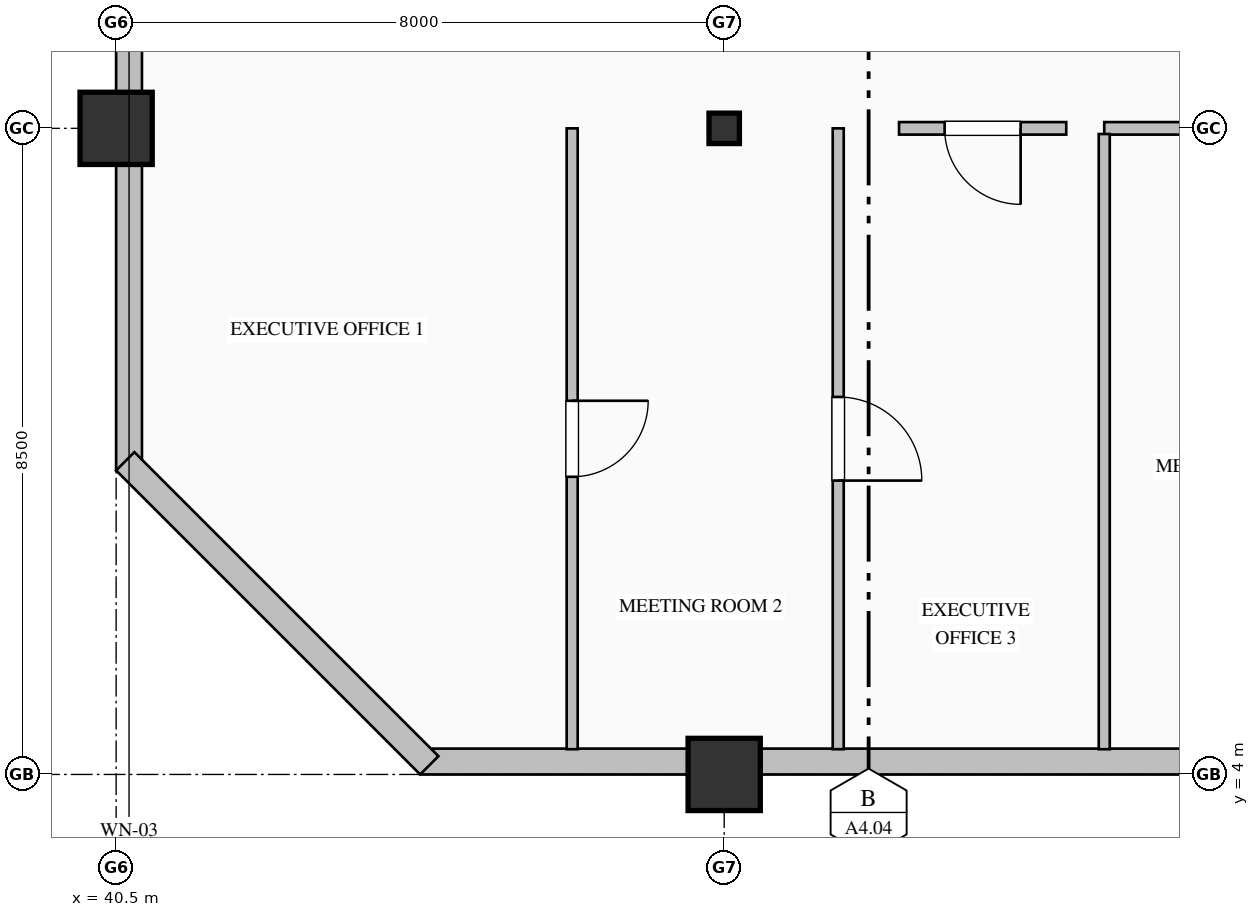
"""IFC4 building model, lengths in metres.
Left out: names, types, materials, properties, quantities, classifications, styles, units other than length and angle.
Written with IfcOpenShell. Run it as: python <this file> out.ifc"""

import sys

from ifc_helpers import new_model, si_unit, direction, frame, frame_2d, origin, origin_2d, place, context, subcontext, project, spatial, rectangle, hollow_rectangle, i_section, extrude, element, fill, save


model = new_model("IFC4")
c1 = context("Model", 3, precision=1e-05, world=origin(), true_north=direction((0.0, 1.0)))
c2 = subcontext(c1, "Body", "Model", "MODEL_VIEW")
j1 = project(units=[si_unit("LENGTHUNIT", "METRE"), si_unit("PLANEANGLEUNIT", "RADIAN")], contexts=[c1])
p1 = place(None, origin())
s1 = spatial("IfcSite", under=j1, at=p1, CompositionType="ELEMENT")
p2 = place(p1, origin())
s2 = spatial("IfcBuilding", under=s1, at=p2, CompositionType="ELEMENT")
p3 = place(p2, frame((0.0, 0.0, 127.0)))
s3 = spatial("IfcBuildingStorey", under=s2, at=p3, CompositionType="ELEMENT", Elevation=127.0)
for number, where, z_axis, x_axis in (
    (1, (40.5, 12.5, 0.0), (0.0, 0.0, 1.0), (1.0, 0.0, 0.0)),
    (2, (48.5, 4.0, 0.0), (0.0, 0.0, 1.0), (1.0, 0.0, 0.0)),
):
    element("IfcColumn", number, at=place(p3, frame(where, z_axis=z_axis, x_axis=x_axis)), inside=s3, PredefinedType="COLUMN", context=c2, shape_type="SweptSolid", body=[
        extrude(hollow_rectangle(XDim=0.95, YDim=0.95, WallThickness=0.036, at=origin_2d()), origin(), (0.0, 0.0, 1.0), 4.0),
    ])
p4 = place(p3, frame((48.5, 12.5, 0.0), z_axis=(0.0, 0.0, 1.0), x_axis=(1.0, 0.0, 0.0)))
e3 = element("IfcColumn", 3, at=p4, inside=s3, PredefinedType="COLUMN", context=c2, shape_type="SweptSolid", body=[
    extrude(i_section(OverallWidth=0.4, OverallDepth=0.4, WebThickness=0.013, FlangeThickness=0.021, FilletRadius=0.022, at=origin_2d()), origin(), (0.0, 0.0, 1.0), 4.0),
])
p5 = place(p3, frame((40.67, 8.0, 0.0), z_axis=(0.0, 0.0, 1.0), x_axis=(0.0, 1.0, 0.0)))
e4 = element("IfcWall", 4, at=p5, inside=s3, PredefinedType="SOLIDWALL", context=c2, shape_type="SweptSolid", body=[
    extrude(rectangle(XDim=20.34, YDim=0.34, at=frame_2d((10.17, 0.0))), origin(), (0.0, 0.0, 1.0), 3.165),
])
p6 = place(p5, frame((13.65, 0.0, 0.85)))
e5 = element("IfcOpeningElement", 5, at=p6, cuts=e4, PredefinedType="OPENING", context=c2, shape_type="SweptSolid", body=[
    extrude(rectangle(XDim=1.5, YDim=1.95, at=frame_2d((0.75, 0.975))), frame((0.0, 0.18, 0.0), z_axis=(0.0, -1.0, 0.0), x_axis=(1.0, 0.0, 0.0)), (0.0, 0.0, 1.0), 0.36),
])
p7 = place(p3, frame((60.0, 4.17, 0.0), z_axis=(0.0, 0.0, 1.0), x_axis=(-1.0, 0.0, 0.0)))
e6 = element("IfcWall", 6, at=p7, inside=s3, PredefinedType="SOLIDWALL", context=c2, shape_type="SweptSolid", body=[
    extrude(rectangle(XDim=15.5, YDim=0.34, at=frame_2d((7.75, 0.0))), origin(), (0.0, 0.0, 1.0), 3.265),
])
p8 = place(p3, frame((44.62, 4.12, 0.0), z_axis=(0.0, 0.0, 1.0), x_axis=(-0.707106781187, 0.707106781187, 0.0)))
e7 = element("IfcWall", 7, at=p8, inside=s3, PredefinedType="SOLIDWALL", context=c2, shape_type="SweptSolid", body=[
    extrude(rectangle(XDim=5.657, YDim=0.34, at=frame_2d((2.828, 0.0))), origin(), (0.0, 0.0, 1.0), 3.765),
])
p9 = place(p3, frame((53.0, 12.5, 0.0), z_axis=(0.0, 0.0, 1.0), x_axis=(-1.0, 0.0, 0.0)))
e8 = element("IfcWall", 8, at=p9, inside=s3, PredefinedType="PARTITIONING", context=c2, shape_type="SweptSolid", body=[
    extrude(rectangle(XDim=2.2, YDim=0.165, at=frame_2d((1.1, 0.0))), origin(), (0.0, 0.0, 1.0), 3.157),
])
p10 = place(p9, frame((0.6, 0.0, 0.0)))
e9 = element("IfcOpeningElement", 9, at=p10, cuts=e8, PredefinedType="OPENING", context=c2, shape_type="SweptSolid", body=[
    extrude(rectangle(XDim=1.0, YDim=2.15, at=frame_2d((0.5, 1.075))), frame((0.0, 0.093, 0.0), z_axis=(0.0, -1.0, 0.0), x_axis=(1.0, 0.0, 0.0)), (0.0, 0.0, 1.0), 0.185),
])
p11 = place(p3, frame((57.0, 12.5, 0.0), z_axis=(0.0, 0.0, 1.0), x_axis=(-1.0, 0.0, 0.0)))
e10 = element("IfcWall", 10, at=p11, inside=s3, PredefinedType="PARTITIONING", context=c2, shape_type="SweptSolid", body=[
    extrude(rectangle(XDim=3.5, YDim=0.165, at=frame_2d((1.75, 0.0))), origin(), (0.0, 0.0, 1.0), 3.157),
])
p12 = place(p11, frame((1.2, 0.0, 0.0)))
e11 = element("IfcOpeningElement", 11, at=p12, cuts=e10, PredefinedType="OPENING", context=c2, shape_type="SweptSolid", body=[
    extrude(rectangle(XDim=1.1, YDim=2.2, at=frame_2d((0.55, 1.1))), frame((0.0, 0.093, 0.0), z_axis=(0.0, -1.0, 0.0), x_axis=(1.0, 0.0, 0.0)), (0.0, 0.0, 1.0), 0.185),
])
p13 = place(p3, frame((46.5, 12.5, 0.0), z_axis=(0.0, 0.0, 1.0), x_axis=(0.0, -1.0, 0.0)))
e12 = element("IfcWall", 12, at=p13, inside=s3, PredefinedType="PARTITIONING", context=c2, shape_type="SweptSolid", body=[
    extrude(rectangle(XDim=8.168, YDim=0.145, at=frame_2d((4.084, 0.0))), origin(), (0.0, 0.0, 1.0), 3.765),
])
p14 = place(p13, frame((3.584, 0.0, 0.0)))
e13 = element("IfcOpeningElement", 13, at=p14, cuts=e12, PredefinedType="OPENING", context=c2, shape_type="SweptSolid", body=[
    extrude(rectangle(XDim=1.0, YDim=2.15, at=frame_2d((0.5, 1.075))), frame((0.0, 0.083, 0.0), z_axis=(0.0, -1.0, 0.0), x_axis=(1.0, 0.0, 0.0)), (0.0, 0.0, 1.0), 0.165),
])
p15 = place(p3, frame((50.0, 12.5, 0.0), z_axis=(0.0, 0.0, 1.0), x_axis=(0.0, -1.0, 0.0)))
e14 = element("IfcWall", 14, at=p15, inside=s3, PredefinedType="PARTITIONING", context=c2, shape_type="SweptSolid", body=[
    extrude(rectangle(XDim=8.168, YDim=0.145, at=frame_2d((4.084, 0.0))), origin(), (0.0, 0.0, 1.0), 3.765),
])
p16 = place(p15, frame((3.534, 0.0, 0.0)))
e15 = element("IfcOpeningElement", 15, at=p16, cuts=e14, PredefinedType="OPENING", context=c2, shape_type="SweptSolid", body=[
    extrude(rectangle(XDim=1.1, YDim=2.2, at=frame_2d((0.55, 1.1))), frame((0.0, 0.083, 0.0), z_axis=(0.0, -1.0, 0.0), x_axis=(1.0, 0.0, 0.0)), (0.0, 0.0, 1.0), 0.165),
])
p17 = place(p3, frame((53.5, 12.426, 0.0), z_axis=(0.0, 0.0, 1.0), x_axis=(0.0, -1.0, 0.0)))
e16 = element("IfcWall", 16, at=p17, inside=s3, PredefinedType="PARTITIONING", context=c2, shape_type="SweptSolid", body=[
    extrude(rectangle(XDim=8.094, YDim=0.145, at=frame_2d((4.047, 0.0))), origin(), (0.0, 0.0, 1.0), 3.765),
])
p18 = place(p14, origin())
e17 = element("IfcDoor", 17, at=p18, inside=s3, OperationType="SINGLE_SWING_LEFT", PredefinedType="DOOR", context=c2, shape_type="SweptSolid", body=[
    extrude(rectangle(XDim=1.0, YDim=2.15, at=frame_2d((0.5, 1.075))), frame((0.0, 0.025, 0.0), z_axis=(0.0, -1.0, 0.0), x_axis=(1.0, 0.0, 0.0)), (0.0, 0.0, 1.0), 0.05),
])
fill(e13, e17)
p19 = place(p16, origin())
e18 = element("IfcDoor", 18, at=p19, inside=s3, OperationType="SINGLE_SWING_RIGHT", PredefinedType="DOOR", context=c2, shape_type="SweptSolid", body=[
    extrude(rectangle(XDim=1.1, YDim=2.2, at=frame_2d((0.55, 1.1))), frame((0.0, 0.025, 0.0), z_axis=(0.0, -1.0, 0.0), x_axis=(1.0, 0.0, 0.0)), (0.0, 0.0, 1.0), 0.05),
])
fill(e15, e18)
p20 = place(p10, origin())
e19 = element("IfcDoor", 19, at=p20, inside=s3, OperationType="SINGLE_SWING_LEFT", PredefinedType="DOOR", context=c2, shape_type="SweptSolid", body=[
    extrude(rectangle(XDim=1.0, YDim=2.15, at=frame_2d((0.5, 1.075))), frame((0.0, 0.025, 0.0), z_axis=(0.0, -1.0, 0.0), x_axis=(1.0, 0.0, 0.0)), (0.0, 0.0, 1.0), 0.05),
])
fill(e9, e19)
save(model, sys.argv[1])
